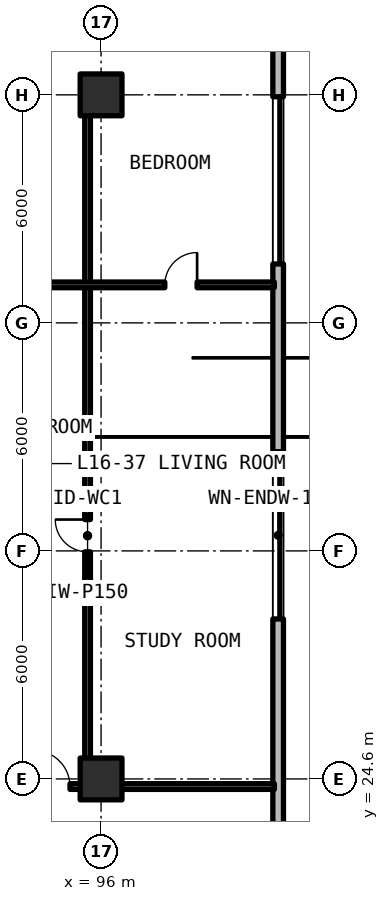
"""IFC4 building model, lengths in metres.
Left out: names, types, materials, properties, quantities, classifications, styles, units other than length and angle.
Written with IfcOpenShell. Run it as: python <this file> out.ifc"""

import sys

from ifc_helpers import new_model, si_unit, direction, frame, frame_2d, origin, origin_2d, place, context, subcontext, project, spatial, rectangle, extrude, element, fill, save


model = new_model("IFC4")
c1 = context("Model", 3, precision=1e-05, world=origin(), true_north=direction((0.0, 1.0)))
c2 = subcontext(c1, "Body", "Model", "MODEL_VIEW")
j1 = project(units=[si_unit("LENGTHUNIT", "METRE"), si_unit("PLANEANGLEUNIT", "RADIAN")], contexts=[c1])
p1 = place(None, origin())
s1 = spatial("IfcSite", under=j1, at=p1, CompositionType="ELEMENT")
p2 = place(p1, origin())
s2 = spatial("IfcBuilding", under=s1, at=p2, CompositionType="ELEMENT")
p3 = place(p2, frame((0.0, 0.0, 58.74)))
s3 = spatial("IfcBuildingStorey", under=s2, at=p3, CompositionType="ELEMENT", Elevation=58.74)
for number, where, z_axis, x_axis in (
    (1, (96.0, 24.6, 0.0), (0.0, 0.0, 1.0), (1.0, 0.0, 0.0)),
    (2, (96.0, 42.6, 0.0), (0.0, 0.0, 1.0), (1.0, 0.0, 0.0)),
):
    element("IfcColumn", number, at=place(p3, frame(where, z_axis=z_axis, x_axis=x_axis)), inside=s3, PredefinedType="COLUMN", context=c2, shape_type="SweptSolid", body=[
        extrude(rectangle(XDim=1.1, YDim=1.1, at=origin_2d()), origin(), (0.0, 0.0, 1.0), 3.63),
    ])
p4 = place(p3, frame((100.66, 11.858, 0.0), z_axis=(0.0, 0.0, 1.0), x_axis=(0.0, 1.0, 0.0)))
e3 = element("IfcWall", 3, at=p4, inside=s3, PredefinedType="SOLIDWALL", context=c2, shape_type="SweptSolid", body=[
    extrude(rectangle(XDim=43.484, YDim=0.28, at=frame_2d((21.742, 0.0))), origin(), (0.0, 0.0, 1.0), 3.41),
])
p5 = place(p4, frame((16.952, 0.0, 0.78)))
e4 = element("IfcOpeningElement", 4, at=p5, cuts=e3, PredefinedType="OPENING", context=c2, shape_type="SweptSolid", body=[
    extrude(rectangle(XDim=4.4, YDim=1.66, at=frame_2d((2.2, 0.83))), frame((0.0, 0.15, 0.0), z_axis=(0.0, -1.0, 0.0), x_axis=(1.0, 0.0, 0.0)), (0.0, 0.0, 1.0), 0.3),
])
p6 = place(p4, frame((26.292, 0.0, 0.78)))
e5 = element("IfcOpeningElement", 5, at=p6, cuts=e3, PredefinedType="OPENING", context=c2, shape_type="SweptSolid", body=[
    extrude(rectangle(XDim=4.4, YDim=1.66, at=frame_2d((2.2, 0.83))), frame((0.0, 0.15, 0.0), z_axis=(0.0, -1.0, 0.0), x_axis=(1.0, 0.0, 0.0)), (0.0, 0.0, 1.0), 0.3),
])
p7 = place(p4, frame((1.511, 0.0, 0.78)))
e6 = element("IfcOpeningElement", 6, at=p7, cuts=e3, PredefinedType="OPENING", context=c2, shape_type="SweptSolid", body=[
    extrude(rectangle(XDim=4.4, YDim=1.66, at=frame_2d((2.2, 0.83))), frame((0.0, 0.15, 0.0), z_axis=(0.0, -1.0, 0.0), x_axis=(1.0, 0.0, 0.0)), (0.0, 0.0, 1.0), 0.3),
])
p8 = place(p3, frame((95.645, 24.4, 0.0), z_axis=(0.0, 0.0, 1.0), x_axis=(0.0, 1.0, 0.0)))
e7 = element("IfcWall", 7, at=p8, inside=s3, PredefinedType="PARTITIONING", context=c2, shape_type="SweptSolid", body=[
    extrude(rectangle(XDim=13.2, YDim=0.15, at=frame_2d((6.6, 0.0))), origin(), (0.0, 0.0, 1.0), 2.63),
])
p9 = place(p8, frame((6.175, 0.0, 0.0)))
e8 = element("IfcOpeningElement", 8, at=p9, cuts=e7, PredefinedType="OPENING", context=c2, shape_type="SweptSolid", body=[
    extrude(rectangle(XDim=0.85, YDim=2.1, at=frame_2d((0.425, 1.05))), frame((0.0, 0.085, 0.0), z_axis=(0.0, -1.0, 0.0), x_axis=(1.0, 0.0, 0.0)), (0.0, 0.0, 1.0), 0.17),
])
p10 = place(p3, frame((95.645, 37.6, 0.0), z_axis=(0.0, 0.0, 1.0), x_axis=(0.0, 1.0, 0.0)))
e9 = element("IfcWall", 9, at=p10, inside=s3, PredefinedType="PARTITIONING", context=c2, shape_type="SweptSolid", body=[
    extrude(rectangle(XDim=5.2, YDim=0.15, at=frame_2d((2.6, 0.0))), origin(), (0.0, 0.0, 1.0), 2.63),
])
p11 = place(p3, frame((90.32, 37.6, 0.0), z_axis=(0.0, 0.0, 1.0), x_axis=(1.0, 0.0, 0.0)))
e10 = element("IfcWall", 10, at=p11, inside=s3, PredefinedType="PARTITIONING", context=c2, shape_type="SweptSolid", body=[
    extrude(rectangle(XDim=10.24, YDim=0.15, at=frame_2d((5.12, 0.0))), origin(), (0.0, 0.0, 1.0), 2.63),
])
p12 = place(p11, frame((3.412, 0.0, 0.0)))
e11 = element("IfcOpeningElement", 11, at=p12, cuts=e10, PredefinedType="OPENING", context=c2, shape_type="SweptSolid", body=[
    extrude(rectangle(XDim=0.85, YDim=2.1, at=frame_2d((0.425, 1.05))), frame((0.0, 0.085, 0.0), z_axis=(0.0, -1.0, 0.0), x_axis=(1.0, 0.0, 0.0)), (0.0, 0.0, 1.0), 0.17),
])
p13 = place(p11, frame((7.357, 0.0, 0.0)))
e12 = element("IfcOpeningElement", 12, at=p13, cuts=e10, PredefinedType="OPENING", context=c2, shape_type="SweptSolid", body=[
    extrude(rectangle(XDim=0.85, YDim=2.1, at=frame_2d((0.425, 1.05))), frame((0.0, 0.085, 0.0), z_axis=(0.0, -1.0, 0.0), x_axis=(1.0, 0.0, 0.0)), (0.0, 0.0, 1.0), 0.17),
])
p14 = place(p3, frame((90.32, 24.4, 0.0), z_axis=(0.0, 0.0, 1.0), x_axis=(1.0, 0.0, 0.0)))
e13 = element("IfcWall", 13, at=p14, inside=s3, PredefinedType="SOLIDWALL", context=c2, shape_type="SweptSolid", body=[
    extrude(rectangle(XDim=10.24, YDim=0.15, at=frame_2d((5.12, 0.0))), origin(), (0.0, 0.0, 1.0), 2.625),
])
p15 = place(p14, frame((3.913, 0.0, 0.0)))
e14 = element("IfcOpeningElement", 14, at=p15, cuts=e13, PredefinedType="OPENING", context=c2, shape_type="SweptSolid", body=[
    extrude(rectangle(XDim=0.95, YDim=2.15, at=frame_2d((0.475, 1.075))), frame((0.0, 0.085, 0.0), z_axis=(0.0, -1.0, 0.0), x_axis=(1.0, 0.0, 0.0)), (0.0, 0.0, 1.0), 0.17),
])
p16 = place(p5, origin())
e15 = element("IfcWindow", 15, at=p16, inside=s3, PartitioningType="SINGLE_PANEL", PredefinedType="WINDOW", context=c2, shape_type="SweptSolid", body=[
    extrude(rectangle(XDim=4.4, YDim=1.66, at=frame_2d((2.2, 0.83))), frame((0.0, 0.03, 0.0), z_axis=(0.0, -1.0, 0.0), x_axis=(1.0, 0.0, 0.0)), (0.0, 0.0, 1.0), 0.06),
])
fill(e4, e15)
p17 = place(p6, origin())
e16 = element("IfcWindow", 16, at=p17, inside=s3, PartitioningType="SINGLE_PANEL", PredefinedType="WINDOW", context=c2, shape_type="SweptSolid", body=[
    extrude(rectangle(XDim=4.4, YDim=1.66, at=frame_2d((2.2, 0.83))), frame((0.0, 0.03, 0.0), z_axis=(0.0, -1.0, 0.0), x_axis=(1.0, 0.0, 0.0)), (0.0, 0.0, 1.0), 0.06),
])
fill(e5, e16)
p18 = place(p9, origin())
e17 = element("IfcDoor", 17, at=p18, inside=s3, OperationType="SINGLE_SWING_RIGHT", PredefinedType="DOOR", context=c2, shape_type="SweptSolid", body=[
    extrude(rectangle(XDim=0.85, YDim=2.1, at=frame_2d((0.425, 1.05))), frame((0.0, 0.025, 0.0), z_axis=(0.0, -1.0, 0.0), x_axis=(1.0, 0.0, 0.0)), (0.0, 0.0, 1.0), 0.05),
])
fill(e8, e17)
p19 = place(p13, origin())
e18 = element("IfcDoor", 18, at=p19, inside=s3, OperationType="SINGLE_SWING_RIGHT", PredefinedType="DOOR", context=c2, shape_type="SweptSolid", body=[
    extrude(rectangle(XDim=0.85, YDim=2.1, at=frame_2d((0.425, 1.05))), frame((0.0, 0.025, 0.0), z_axis=(0.0, -1.0, 0.0), x_axis=(1.0, 0.0, 0.0)), (0.0, 0.0, 1.0), 0.05),
])
fill(e12, e18)
p20 = place(p15, origin())
e19 = element("IfcDoor", 19, at=p20, inside=s3, OperationType="SINGLE_SWING_LEFT", PredefinedType="DOOR", context=c2, shape_type="SweptSolid", body=[
    extrude(rectangle(XDim=0.95, YDim=2.15, at=frame_2d((0.475, 1.075))), frame((0.0, 0.025, 0.0), z_axis=(0.0, -1.0, 0.0), x_axis=(1.0, 0.0, 0.0)), (0.0, 0.0, 1.0), 0.05),
])
fill(e14, e19)
save(model, sys.argv[1])
